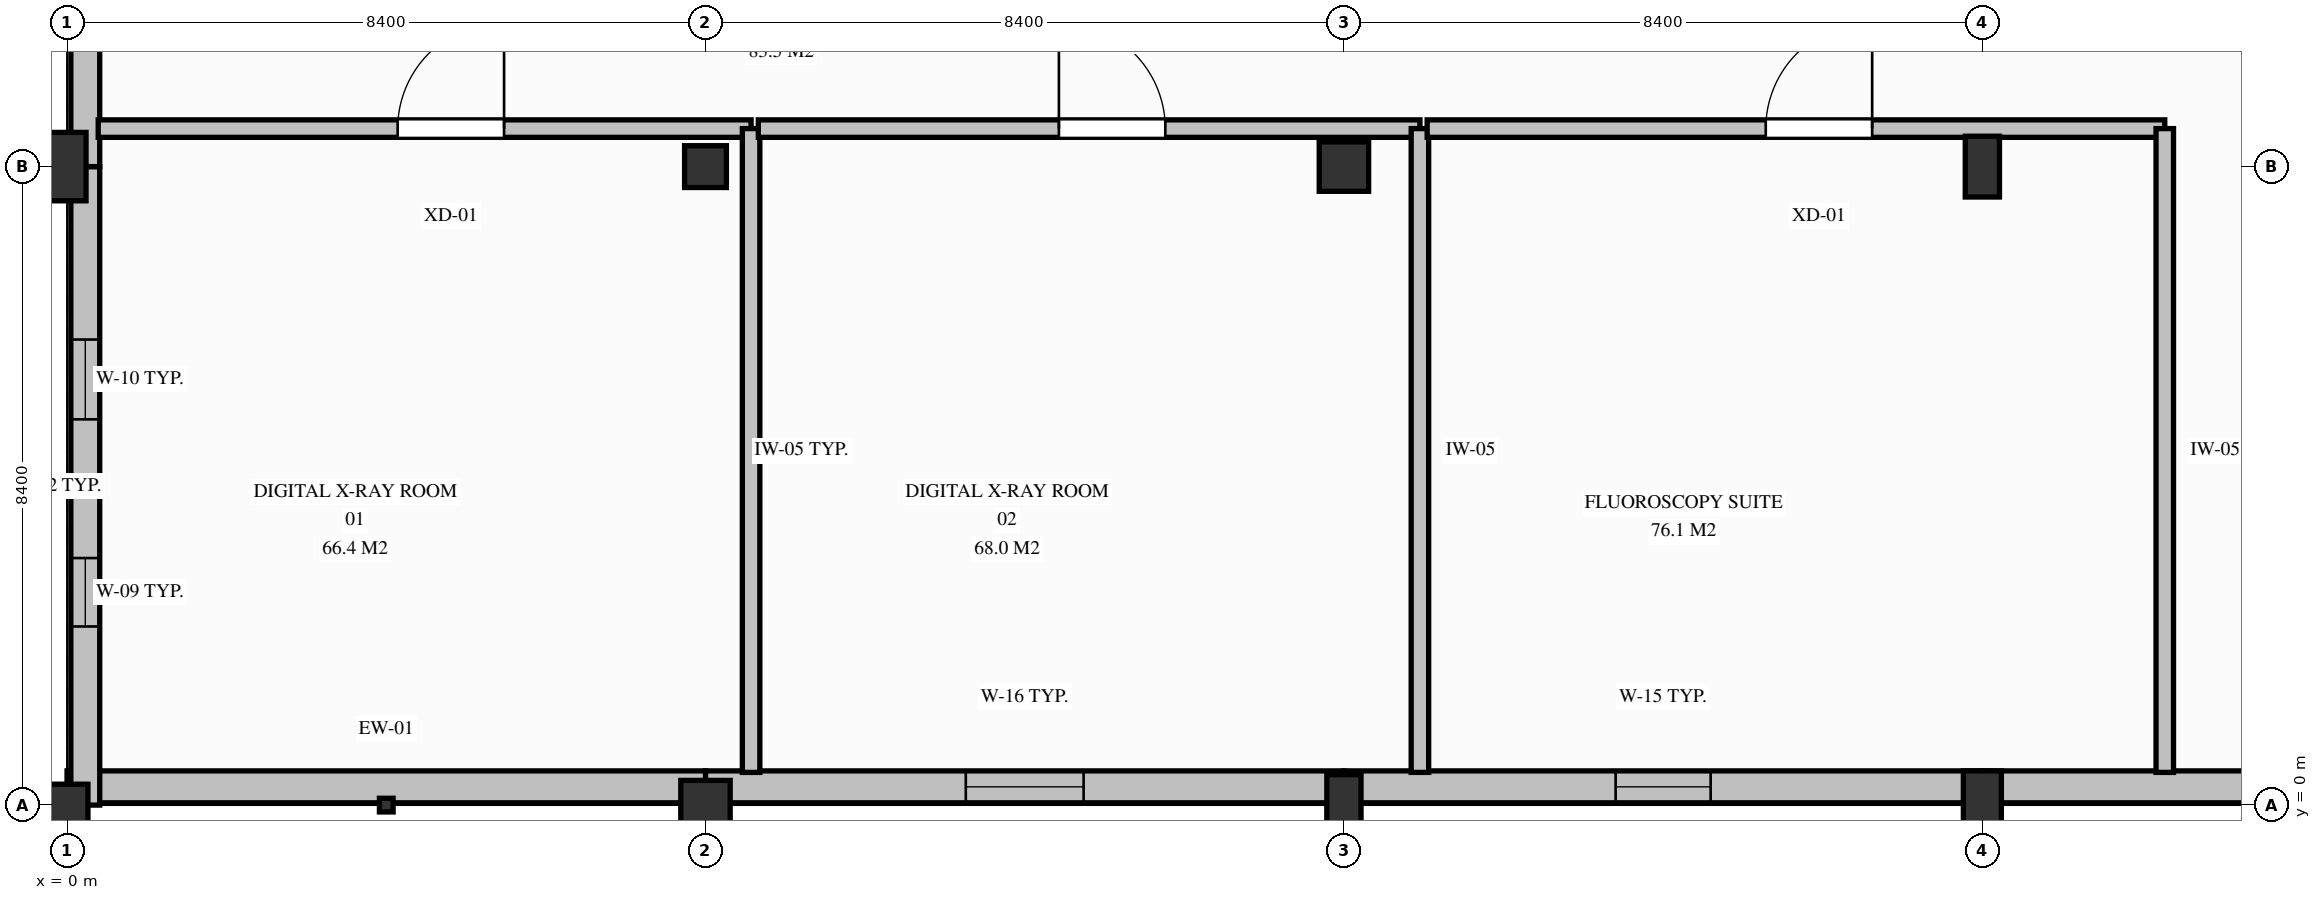
"""IFC4 building model, lengths in metres.
Left out: names, types, materials, properties, quantities, classifications, styles, units other than length and angle.
Written with IfcOpenShell. Run it as: python <this file> out.ifc"""

import sys

from ifc_helpers import new_model, si_unit, direction, frame, frame_2d, origin, origin_with_axes, origin_2d, place, context, subcontext, project, spatial, rectangle, hollow_rectangle, circle, extrude, element, fill, save


model = new_model("IFC4")
c1 = context("Model", 3, precision=1e-05, world=origin(), true_north=direction((0.0, 1.0)))
c2 = subcontext(c1, "Body", "Model", "MODEL_VIEW")
j1 = project(units=[si_unit("LENGTHUNIT", "METRE"), si_unit("PLANEANGLEUNIT", "RADIAN")], contexts=[c1])
p1 = place(None, origin())
s1 = spatial("IfcSite", under=j1, at=p1, CompositionType="ELEMENT")
p2 = place(p1, origin())
s2 = spatial("IfcBuilding", under=s1, at=p2, CompositionType="ELEMENT")
p3 = place(p2, frame((0.0, 0.0, 4.5)))
s3 = spatial("IfcBuildingStorey", under=s2, at=p3, CompositionType="ELEMENT", Elevation=4.5)
p4 = place(p3, origin_with_axes())
e1 = element("IfcColumn", 1, at=p4, inside=s3, PredefinedType="COLUMN", context=c2, shape_type="SweptSolid", body=[
    extrude(circle(Radius=0.275, at=origin_2d()), origin(), (0.0, 0.0, 1.0), 4.5),
])
p5 = place(p3, frame((0.0, 8.4, 0.0), z_axis=(0.0, 0.0, 1.0), x_axis=(1.0, 0.0, 0.0)))
e2 = element("IfcColumn", 2, at=p5, inside=s3, PredefinedType="COLUMN", context=c2, shape_type="SweptSolid", body=[
    extrude(rectangle(XDim=0.5, YDim=0.9, at=origin_2d()), origin(), (0.0, 0.0, 1.0), 4.5),
])
p6 = place(p3, frame((8.4, 0.0, 0.0), z_axis=(0.0, 0.0, 1.0), x_axis=(1.0, 0.0, 0.0)))
e3 = element("IfcColumn", 3, at=p6, inside=s3, PredefinedType="COLUMN", context=c2, shape_type="SweptSolid", body=[
    extrude(circle(Radius=0.325, at=origin_2d()), origin(), (0.0, 0.0, 1.0), 4.5),
])
p7 = place(p3, frame((8.4, 8.4, 0.0), z_axis=(0.0, 0.0, 1.0), x_axis=(1.0, 0.0, 0.0)))
e4 = element("IfcColumn", 4, at=p7, inside=s3, PredefinedType="COLUMN", context=c2, shape_type="SweptSolid", body=[
    extrude(circle(Radius=0.275, at=origin_2d()), origin(), (0.0, 0.0, 1.0), 4.5),
])
p8 = place(p3, frame((16.8, 0.0, 0.0), z_axis=(0.0, 0.0, 1.0), x_axis=(1.0, 0.0, 0.0)))
e5 = element("IfcColumn", 5, at=p8, inside=s3, PredefinedType="COLUMN", context=c2, shape_type="SweptSolid", body=[
    extrude(rectangle(XDim=0.45, YDim=0.8, at=origin_2d()), origin(), (0.0, 0.0, 1.0), 4.5),
])
p9 = place(p3, frame((16.8, 8.4, 0.0), z_axis=(0.0, 0.0, 1.0), x_axis=(1.0, 0.0, 0.0)))
e6 = element("IfcColumn", 6, at=p9, inside=s3, PredefinedType="COLUMN", context=c2, shape_type="SweptSolid", body=[
    extrude(circle(Radius=0.325, at=origin_2d()), origin(), (0.0, 0.0, 1.0), 4.5),
])
p10 = place(p3, frame((25.2, 0.0, 0.0), z_axis=(0.0, 0.0, 1.0), x_axis=(1.0, 0.0, 0.0)))
e7 = element("IfcColumn", 7, at=p10, inside=s3, PredefinedType="COLUMN", context=c2, shape_type="SweptSolid", body=[
    extrude(rectangle(XDim=0.5, YDim=0.9, at=origin_2d()), origin(), (0.0, 0.0, 1.0), 4.5),
])
p11 = place(p3, frame((25.2, 8.4, 0.0), z_axis=(0.0, 0.0, 1.0), x_axis=(1.0, 0.0, 0.0)))
e8 = element("IfcColumn", 8, at=p11, inside=s3, PredefinedType="COLUMN", context=c2, shape_type="SweptSolid", body=[
    extrude(rectangle(XDim=0.45, YDim=0.8, at=origin_2d()), origin(), (0.0, 0.0, 1.0), 4.5),
])
p12 = place(p3, frame((4.2, 0.0, 0.0), z_axis=(0.0, 0.0, 1.0), x_axis=(1.0, 0.0, 0.0)))
e9 = element("IfcColumn", 9, at=p12, inside=s3, PredefinedType="PILASTER", context=c2, shape_type="SweptSolid", body=[
    extrude(hollow_rectangle(XDim=0.18, YDim=0.18, WallThickness=0.01, InnerFilletRadius=0.015, OuterFilletRadius=0.025, at=origin_2d()), origin(), (0.0, 0.0, 1.0), 4.5),
])
p13 = place(p3, frame((33.6, 0.24, 0.0), z_axis=(0.0, 0.0, 1.0), x_axis=(-1.0, 0.0, 0.0)))
e10 = element("IfcWall", 10, at=p13, inside=s3, PredefinedType="SOLIDWALL", context=c2, shape_type="SweptSolid", body=[
    extrude(rectangle(XDim=8.4, YDim=0.42, at=frame_2d((4.2, 0.0))), origin(), (0.0, 0.0, 1.0), 2.868),
])
p14 = place(p3, frame((25.2, 0.24, 0.0), z_axis=(0.0, 0.0, 1.0), x_axis=(-1.0, 0.0, 0.0)))
e11 = element("IfcWall", 11, at=p14, inside=s3, PredefinedType="SOLIDWALL", context=c2, shape_type="SweptSolid", body=[
    extrude(rectangle(XDim=8.4, YDim=0.42, at=frame_2d((4.2, 0.0))), origin(), (0.0, 0.0, 1.0), 2.868),
])
p15 = place(p14, frame((3.575, 0.0, 0.85)))
e12 = element("IfcOpeningElement", 12, at=p15, cuts=e11, PredefinedType="OPENING", context=c2, shape_type="SweptSolid", body=[
    extrude(rectangle(XDim=1.25, YDim=1.5, at=frame_2d((0.625, 0.75))), frame((0.0, 0.22, 0.0), z_axis=(0.0, -1.0, 0.0), x_axis=(1.0, 0.0, 0.0)), (0.0, 0.0, 1.0), 0.44),
])
p16 = place(p3, frame((16.8, 0.24, 0.0), z_axis=(0.0, 0.0, 1.0), x_axis=(-1.0, 0.0, 0.0)))
e13 = element("IfcWall", 13, at=p16, inside=s3, PredefinedType="SOLIDWALL", context=c2, shape_type="SweptSolid", body=[
    extrude(rectangle(XDim=8.4, YDim=0.42, at=frame_2d((4.2, 0.0))), origin(), (0.0, 0.0, 1.0), 2.868),
])
p17 = place(p16, frame((3.425, 0.0, 0.85)))
e14 = element("IfcOpeningElement", 14, at=p17, cuts=e13, PredefinedType="OPENING", context=c2, shape_type="SweptSolid", body=[
    extrude(rectangle(XDim=1.55, YDim=1.6, at=frame_2d((0.775, 0.8))), frame((0.0, 0.22, 0.0), z_axis=(0.0, -1.0, 0.0), x_axis=(1.0, 0.0, 0.0)), (0.0, 0.0, 1.0), 0.44),
])
p18 = place(p3, frame((8.4, 0.24, 0.0), z_axis=(0.0, 0.0, 1.0), x_axis=(-1.0, 0.0, 0.0)))
e15 = element("IfcWall", 15, at=p18, inside=s3, PredefinedType="SOLIDWALL", context=c2, shape_type="SweptSolid", body=[
    extrude(rectangle(XDim=8.4, YDim=0.42, at=frame_2d((4.2, 0.0))), origin(), (0.0, 0.0, 1.0), 2.868),
])
p19 = place(p3, frame((0.24, 0.0, 0.0), z_axis=(0.0, 0.0, 1.0), x_axis=(0.0, 1.0, 0.0)))
e16 = element("IfcWall", 16, at=p19, inside=s3, PredefinedType="SOLIDWALL", context=c2, shape_type="SweptSolid", body=[
    extrude(rectangle(XDim=8.4, YDim=0.38, at=frame_2d((4.2, 0.0))), origin(), (0.0, 0.0, 1.0), 2.868),
])
p20 = place(p19, frame((2.35, 0.0, 0.85)))
e17 = element("IfcOpeningElement", 17, at=p20, cuts=e16, PredefinedType="OPENING", context=c2, shape_type="SweptSolid", body=[
    extrude(rectangle(XDim=0.9, YDim=1.8, at=frame_2d((0.45, 0.9))), frame((0.0, 0.2, 0.0), z_axis=(0.0, -1.0, 0.0), x_axis=(1.0, 0.0, 0.0)), (0.0, 0.0, 1.0), 0.4),
])
p21 = place(p19, frame((5.075, 0.0, 0.85)))
e18 = element("IfcOpeningElement", 18, at=p21, cuts=e16, PredefinedType="OPENING", context=c2, shape_type="SweptSolid", body=[
    extrude(rectangle(XDim=1.05, YDim=1.75, at=frame_2d((0.525, 0.875))), frame((0.0, 0.2, 0.0), z_axis=(0.0, -1.0, 0.0), x_axis=(1.0, 0.0, 0.0)), (0.0, 0.0, 1.0), 0.4),
])
p22 = place(p3, frame((0.24, 8.4, 0.0), z_axis=(0.0, 0.0, 1.0), x_axis=(0.0, 1.0, 0.0)))
e19 = element("IfcWall", 19, at=p22, inside=s3, PredefinedType="SOLIDWALL", context=c2, shape_type="SweptSolid", body=[
    extrude(rectangle(XDim=8.4, YDim=0.38, at=frame_2d((4.2, 0.0))), origin(), (0.0, 0.0, 1.0), 3.978),
])
p23 = place(p22, frame((2.35, 0.0, 0.85)))
e20 = element("IfcOpeningElement", 20, at=p23, cuts=e19, PredefinedType="OPENING", context=c2, shape_type="SweptSolid", body=[
    extrude(rectangle(XDim=0.9, YDim=1.8, at=frame_2d((0.45, 0.9))), frame((0.0, 0.2, 0.0), z_axis=(0.0, -1.0, 0.0), x_axis=(1.0, 0.0, 0.0)), (0.0, 0.0, 1.0), 0.4),
])
p24 = place(p22, frame((5.075, 0.0, 0.85)))
e21 = element("IfcOpeningElement", 21, at=p24, cuts=e19, PredefinedType="OPENING", context=c2, shape_type="SweptSolid", body=[
    extrude(rectangle(XDim=1.05, YDim=1.75, at=frame_2d((0.525, 0.875))), frame((0.0, 0.2, 0.0), z_axis=(0.0, -1.0, 0.0), x_axis=(1.0, 0.0, 0.0)), (0.0, 0.0, 1.0), 0.4),
])
p25 = place(p3, frame((0.41, 8.9, 0.0), z_axis=(0.0, 0.0, 1.0), x_axis=(1.0, 0.0, 0.0)))
e22 = element("IfcWall", 22, at=p25, inside=s3, PredefinedType="PARTITIONING", context=c2, shape_type="SweptSolid", body=[
    extrude(rectangle(XDim=8.59, YDim=0.23, at=frame_2d((4.295, 0.0))), origin(), (0.0, 0.0, 1.0), 3.678),
])
p26 = place(p25, frame((3.94, 0.0, 0.0)))
e23 = element("IfcOpeningElement", 23, at=p26, cuts=e22, PredefinedType="OPENING", context=c2, shape_type="SweptSolid", body=[
    extrude(rectangle(XDim=1.4, YDim=2.2, at=frame_2d((0.7, 1.1))), frame((0.0, 0.125, 0.0), z_axis=(0.0, -1.0, 0.0), x_axis=(1.0, 0.0, 0.0)), (0.0, 0.0, 1.0), 0.25),
])
p27 = place(p3, frame((9.0, 8.9, 0.0), z_axis=(0.0, 0.0, 1.0), x_axis=(0.0, -1.0, 0.0)))
e24 = element("IfcWall", 24, at=p27, inside=s3, PredefinedType="PARTITIONING", context=c2, shape_type="SweptSolid", body=[
    extrude(rectangle(XDim=8.47, YDim=0.23, at=frame_2d((4.235, 0.0))), origin(), (0.0, 0.0, 1.0), 3.728),
])
p28 = place(p3, frame((9.095, 8.9, 0.0), z_axis=(0.0, 0.0, 1.0), x_axis=(1.0, 0.0, 0.0)))
e25 = element("IfcWall", 25, at=p28, inside=s3, PredefinedType="PARTITIONING", context=c2, shape_type="SweptSolid", body=[
    extrude(rectangle(XDim=8.705, YDim=0.23, at=frame_2d((4.353, 0.0))), origin(), (0.0, 0.0, 1.0), 3.948),
])
p29 = place(p28, frame((3.955, 0.0, 0.0)))
e26 = element("IfcOpeningElement", 26, at=p29, cuts=e25, PredefinedType="OPENING", context=c2, shape_type="SweptSolid", body=[
    extrude(rectangle(XDim=1.4, YDim=2.2, at=frame_2d((0.7, 1.1))), frame((0.0, 0.125, 0.0), z_axis=(0.0, -1.0, 0.0), x_axis=(1.0, 0.0, 0.0)), (0.0, 0.0, 1.0), 0.25),
])
p30 = place(p3, frame((17.8, 8.9, 0.0), z_axis=(0.0, 0.0, 1.0), x_axis=(0.0, -1.0, 0.0)))
e27 = element("IfcWall", 27, at=p30, inside=s3, PredefinedType="PARTITIONING", context=c2, shape_type="SweptSolid", body=[
    extrude(rectangle(XDim=8.47, YDim=0.23, at=frame_2d((4.235, 0.0))), origin(), (0.0, 0.0, 1.0), 3.778),
])
p31 = place(p3, frame((17.895, 8.9, 0.0), z_axis=(0.0, 0.0, 1.0), x_axis=(1.0, 0.0, 0.0)))
e28 = element("IfcWall", 28, at=p31, inside=s3, PredefinedType="PARTITIONING", context=c2, shape_type="SweptSolid", body=[
    extrude(rectangle(XDim=9.705, YDim=0.23, at=frame_2d((4.853, 0.0))), origin(), (0.0, 0.0, 1.0), 3.888),
])
p32 = place(p31, frame((4.455, 0.0, 0.0)))
e29 = element("IfcOpeningElement", 29, at=p32, cuts=e28, PredefinedType="OPENING", context=c2, shape_type="SweptSolid", body=[
    extrude(rectangle(XDim=1.4, YDim=2.2, at=frame_2d((0.7, 1.1))), frame((0.0, 0.125, 0.0), z_axis=(0.0, -1.0, 0.0), x_axis=(1.0, 0.0, 0.0)), (0.0, 0.0, 1.0), 0.25),
])
p33 = place(p3, frame((27.6, 8.9, 0.0), z_axis=(0.0, 0.0, 1.0), x_axis=(0.0, -1.0, 0.0)))
e30 = element("IfcWall", 30, at=p33, inside=s3, PredefinedType="PARTITIONING", context=c2, shape_type="SweptSolid", body=[
    extrude(rectangle(XDim=8.47, YDim=0.23, at=frame_2d((4.235, 0.0))), origin(), (0.0, 0.0, 1.0), 3.828),
])
p34 = place(p15, origin())
e31 = element("IfcWindow", 31, at=p34, inside=s3, PartitioningType="SINGLE_PANEL", PredefinedType="WINDOW", context=c2, shape_type="SweptSolid", body=[
    extrude(rectangle(XDim=1.25, YDim=1.5, at=frame_2d((0.625, 0.75))), frame((0.0, 0.03, 0.0), z_axis=(0.0, -1.0, 0.0), x_axis=(1.0, 0.0, 0.0)), (0.0, 0.0, 1.0), 0.06),
])
fill(e12, e31)
p35 = place(p17, origin())
e32 = element("IfcWindow", 32, at=p35, inside=s3, PartitioningType="SINGLE_PANEL", PredefinedType="WINDOW", context=c2, shape_type="SweptSolid", body=[
    extrude(rectangle(XDim=1.55, YDim=1.6, at=frame_2d((0.775, 0.8))), frame((0.0, 0.03, 0.0), z_axis=(0.0, -1.0, 0.0), x_axis=(1.0, 0.0, 0.0)), (0.0, 0.0, 1.0), 0.06),
])
fill(e14, e32)
p36 = place(p20, origin())
e33 = element("IfcWindow", 33, at=p36, inside=s3, PartitioningType="SINGLE_PANEL", PredefinedType="WINDOW", context=c2, shape_type="SweptSolid", body=[
    extrude(rectangle(XDim=0.9, YDim=1.8, at=frame_2d((0.45, 0.9))), frame((0.0, 0.03, 0.0), z_axis=(0.0, -1.0, 0.0), x_axis=(1.0, 0.0, 0.0)), (0.0, 0.0, 1.0), 0.06),
])
fill(e17, e33)
p37 = place(p21, origin())
e34 = element("IfcWindow", 34, at=p37, inside=s3, PartitioningType="SINGLE_PANEL", PredefinedType="WINDOW", context=c2, shape_type="SweptSolid", body=[
    extrude(rectangle(XDim=1.05, YDim=1.75, at=frame_2d((0.525, 0.875))), frame((0.0, 0.03, 0.0), z_axis=(0.0, -1.0, 0.0), x_axis=(1.0, 0.0, 0.0)), (0.0, 0.0, 1.0), 0.06),
])
fill(e18, e34)
p38 = place(p26, origin())
e35 = element("IfcDoor", 35, at=p38, inside=s3, OperationType="SINGLE_SWING_RIGHT", PredefinedType="DOOR", context=c2, shape_type="SweptSolid", body=[
    extrude(rectangle(XDim=1.4, YDim=2.2, at=frame_2d((0.7, 1.1))), frame((0.0, 0.025, 0.0), z_axis=(0.0, -1.0, 0.0), x_axis=(1.0, 0.0, 0.0)), (0.0, 0.0, 1.0), 0.05),
])
fill(e23, e35)
p39 = place(p29, origin())
e36 = element("IfcDoor", 36, at=p39, inside=s3, OperationType="SINGLE_SWING_LEFT", PredefinedType="DOOR", context=c2, shape_type="SweptSolid", body=[
    extrude(rectangle(XDim=1.4, YDim=2.2, at=frame_2d((0.7, 1.1))), frame((0.0, 0.025, 0.0), z_axis=(0.0, -1.0, 0.0), x_axis=(1.0, 0.0, 0.0)), (0.0, 0.0, 1.0), 0.05),
])
fill(e26, e36)
p40 = place(p32, origin())
e37 = element("IfcDoor", 37, at=p40, inside=s3, OperationType="SINGLE_SWING_RIGHT", PredefinedType="DOOR", context=c2, shape_type="SweptSolid", body=[
    extrude(rectangle(XDim=1.4, YDim=2.2, at=frame_2d((0.7, 1.1))), frame((0.0, 0.025, 0.0), z_axis=(0.0, -1.0, 0.0), x_axis=(1.0, 0.0, 0.0)), (0.0, 0.0, 1.0), 0.05),
])
fill(e29, e37)
save(model, sys.argv[1])
